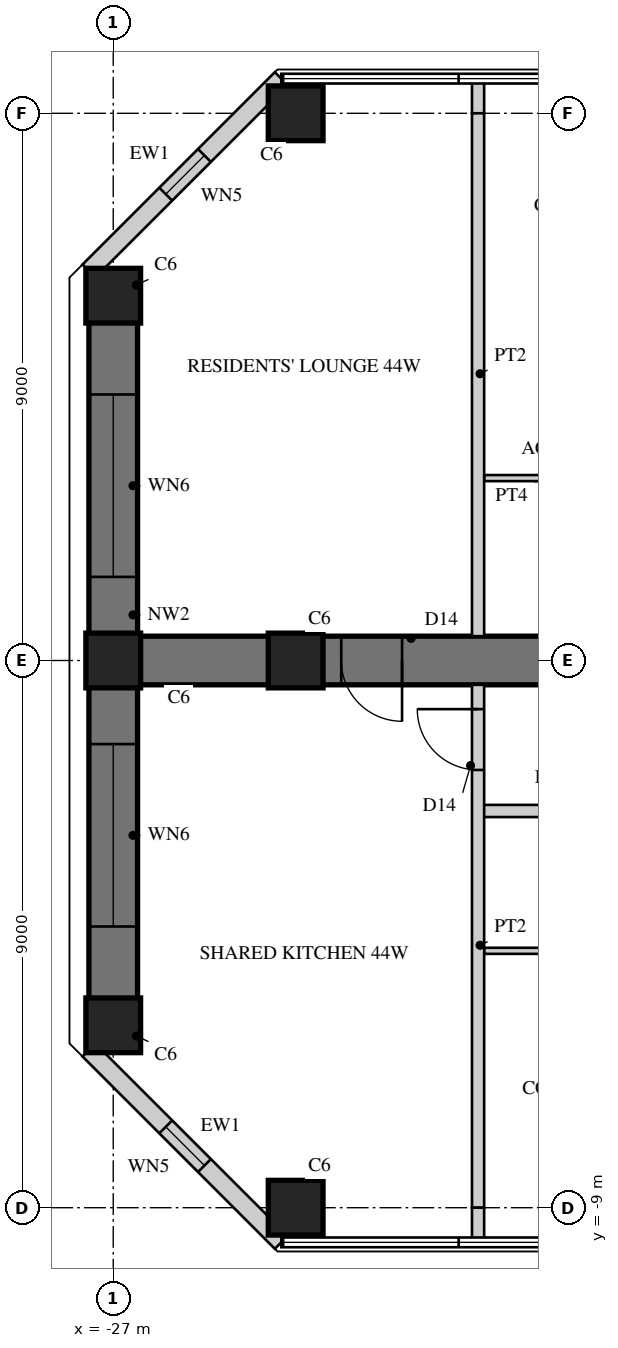
"""IFC4 building model, lengths in metres.
Left out: names, types, materials, properties, quantities, classifications, styles, units other than length and angle.
Written with IfcOpenShell. Run it as: python <this file> out.ifc"""

import sys

from ifc_helpers import new_model, si_unit, direction, frame, frame_2d, origin, origin_2d, place, context, subcontext, project, spatial, rectangle, hollow_rectangle, extrude, element, fill, save


model = new_model("IFC4")
c1 = context("Model", 3, precision=1e-05, world=origin(), true_north=direction((0.0, 1.0)))
c2 = subcontext(c1, "Body", "Model", "MODEL_VIEW")
j1 = project(units=[si_unit("LENGTHUNIT", "METRE"), si_unit("PLANEANGLEUNIT", "RADIAN")], contexts=[c1])
p1 = place(None, origin())
s1 = spatial("IfcSite", under=j1, at=p1, CompositionType="ELEMENT")
p2 = place(p1, origin())
s2 = spatial("IfcBuilding", under=s1, at=p2, CompositionType="ELEMENT")
p3 = place(p2, frame((0.0, 0.0, 179.7)))
s3 = spatial("IfcBuildingStorey", under=s2, at=p3, CompositionType="ELEMENT", Elevation=179.7)
p4 = place(p3, frame((-9.0, 0.0, 0.0), z_axis=(0.0, 0.0, 1.0), x_axis=(-1.0, 0.0, 0.0)))
e1 = element("IfcWall", 1, at=p4, inside=s3, PredefinedType="SHEAR", context=c2, shape_type="SweptSolid", body=[
    extrude(rectangle(XDim=18.0, YDim=0.8, at=frame_2d((9.0, 0.0))), origin(), (0.0, 0.0, 1.0), 3.4),
])
p5 = place(p4, frame((3.95, 0.0, 0.0)))
e2 = element("IfcOpeningElement", 2, at=p5, cuts=e1, PredefinedType="OPENING", context=c2, shape_type="SweptSolid", body=[
    extrude(rectangle(XDim=1.0, YDim=2.15, at=frame_2d((0.5, 1.075))), frame((0.0, 0.41, 0.0), z_axis=(0.0, -1.0, 0.0), x_axis=(1.0, 0.0, 0.0)), (0.0, 0.0, 1.0), 0.82),
])
p6 = place(p4, frame((6.6, 0.0, 0.0)))
e3 = element("IfcOpeningElement", 3, at=p6, cuts=e1, PredefinedType="OPENING", context=c2, shape_type="SweptSolid", body=[
    extrude(rectangle(XDim=1.0, YDim=2.15, at=frame_2d((0.5, 1.075))), frame((0.0, 0.41, 0.0), z_axis=(0.0, -1.0, 0.0), x_axis=(1.0, 0.0, 0.0)), (0.0, 0.0, 1.0), 0.82),
])
p7 = place(p4, frame((13.25, 0.0, 0.0)))
e4 = element("IfcOpeningElement", 4, at=p7, cuts=e1, PredefinedType="OPENING", context=c2, shape_type="SweptSolid", body=[
    extrude(rectangle(XDim=1.0, YDim=2.2, at=frame_2d((0.5, 1.1))), frame((0.0, 0.41, 0.0), z_axis=(0.0, -1.0, 0.0), x_axis=(1.0, 0.0, 0.0)), (0.0, 0.0, 1.0), 0.82),
])
p8 = place(p3, frame((-27.0, 6.0, 0.0), z_axis=(0.0, 0.0, 1.0), x_axis=(0.0, -1.0, 0.0)))
e5 = element("IfcWall", 5, at=p8, inside=s3, PredefinedType="SHEAR", context=c2, shape_type="SweptSolid", body=[
    extrude(rectangle(XDim=12.0, YDim=0.8, at=frame_2d((6.0, 0.0))), origin(), (0.0, 0.0, 1.0), 3.4),
])
p9 = place(p8, frame((1.625, 0.0, 0.6)))
e6 = element("IfcOpeningElement", 6, at=p9, cuts=e5, PredefinedType="OPENING", context=c2, shape_type="SweptSolid", body=[
    extrude(rectangle(XDim=3.0, YDim=2.4, at=frame_2d((1.5, 1.2))), frame((0.0, 0.41, 0.0), z_axis=(0.0, -1.0, 0.0), x_axis=(1.0, 0.0, 0.0)), (0.0, 0.0, 1.0), 0.82),
])
p10 = place(p8, frame((7.375, 0.0, 0.6)))
e7 = element("IfcOpeningElement", 7, at=p10, cuts=e5, PredefinedType="OPENING", context=c2, shape_type="SweptSolid", body=[
    extrude(rectangle(XDim=3.0, YDim=2.4, at=frame_2d((1.5, 1.2))), frame((0.0, 0.41, 0.0), z_axis=(0.0, -1.0, 0.0), x_axis=(1.0, 0.0, 0.0)), (0.0, 0.0, 1.0), 0.82),
])
for number, where, z_axis, x_axis in (
    (8, (-24.0, 9.0, 0.0), (0.0, 0.0, 1.0), (1.0, 0.0, 0.0)),
    (9, (-24.0, -9.0, 0.0), (0.0, 0.0, 1.0), (1.0, 0.0, 0.0)),
    (10, (-27.0, 6.0, 0.0), (0.0, 0.0, 1.0), (1.0, 0.0, 0.0)),
    (11, (-27.0, 0.0, 0.0), (0.0, 0.0, 1.0), (1.0, 0.0, 0.0)),
    (12, (-27.0, -6.0, 0.0), (0.0, 0.0, 1.0), (1.0, 0.0, 0.0)),
    (13, (-24.0, 0.0, 0.0), (0.0, 0.0, 1.0), (1.0, 0.0, 0.0)),
):
    element("IfcColumn", number, at=place(p3, frame(where, z_axis=z_axis, x_axis=x_axis)), inside=s3, PredefinedType="COLUMN", context=c2, shape_type="SweptSolid", body=[
        extrude(rectangle(XDim=0.9, YDim=0.9, at=origin_2d()), origin(), (0.0, 0.0, 1.0), 3.4),
    ])
p11 = place(p3, frame((-24.236, 9.57, 0.0), z_axis=(0.0, 0.0, 1.0), x_axis=(-0.707079499254, -0.707134062067, 0.0)))
e14 = element("IfcWall", 14, at=p11, inside=s3, PredefinedType="SOLIDWALL", context=c2, shape_type="SweptSolid", body=[
    extrude(rectangle(XDim=4.475, YDim=0.3, at=frame_2d((2.237, 0.0))), origin(), (0.0, 0.0, 1.0), 3.22),
])
p12 = place(p11, frame((1.787, 0.0, 0.3)))
e15 = element("IfcOpeningElement", 15, at=p12, cuts=e14, PredefinedType="OPENING", context=c2, shape_type="SweptSolid", body=[
    extrude(rectangle(XDim=0.9, YDim=2.4, at=frame_2d((0.45, 1.2))), frame((0.0, 0.16, 0.0), z_axis=(0.0, -1.0, 0.0), x_axis=(1.0, 0.0, 0.0)), (0.0, 0.0, 1.0), 0.32),
])
p13 = place(p3, frame((-27.4, -6.406, 0.0), z_axis=(0.0, 0.0, 1.0), x_axis=(0.707079499254, -0.707134062067, 0.0)))
e16 = element("IfcWall", 16, at=p13, inside=s3, PredefinedType="SOLIDWALL", context=c2, shape_type="SweptSolid", body=[
    extrude(rectangle(XDim=4.475, YDim=0.3, at=frame_2d((2.237, 0.0))), origin(), (0.0, 0.0, 1.0), 3.22),
])
p14 = place(p13, frame((1.787, 0.0, 0.3)))
e17 = element("IfcOpeningElement", 17, at=p14, cuts=e16, PredefinedType="OPENING", context=c2, shape_type="SweptSolid", body=[
    extrude(rectangle(XDim=0.9, YDim=2.4, at=frame_2d((0.45, 1.2))), frame((0.0, 0.16, 0.0), z_axis=(0.0, -1.0, 0.0), x_axis=(1.0, 0.0, 0.0)), (0.0, 0.0, 1.0), 0.32),
])
for number, where, z_axis, x_axis in (
    (18, (-18.45, -4.775, 0.0), (0.0, 0.0, 1.0), (-1.0, 0.0, 0.0)),
    (19, (-18.45, 3.0, 0.0), (0.0, 0.0, 1.0), (-1.0, 0.0, 0.0)),
):
    element("IfcWall", number, at=place(p3, frame(where, z_axis=z_axis, x_axis=x_axis)), inside=s3, PredefinedType="PARTITIONING", context=c2, shape_type="SweptSolid", body=[
        extrude(rectangle(XDim=2.45, YDim=0.1, at=frame_2d((1.225, 0.0))), origin(), (0.0, 0.0, 1.0), 3.22),
    ])
p15 = place(p3, frame((-9.55, -2.475, 0.0), z_axis=(0.0, 0.0, 1.0), x_axis=(-1.0, 0.0, 0.0)))
e20 = element("IfcWall", 20, at=p15, inside=s3, PredefinedType="SOLIDWALL", context=c2, shape_type="SweptSolid", body=[
    extrude(rectangle(XDim=11.45, YDim=0.2, at=frame_2d((5.725, 0.0))), origin(), (0.0, 0.0, 1.0), 3.22),
])
p16 = place(p15, frame((3.6, 0.0, 0.0)))
e21 = element("IfcOpeningElement", 21, at=p16, cuts=e20, PredefinedType="OPENING", context=c2, shape_type="SweptSolid", body=[
    extrude(rectangle(XDim=1.0, YDim=2.15, at=frame_2d((0.5, 1.075))), frame((0.0, 0.11, 0.0), z_axis=(0.0, -1.0, 0.0), x_axis=(1.0, 0.0, 0.0)), (0.0, 0.0, 1.0), 0.22),
])
p17 = place(p15, frame((6.05, 0.0, 0.0)))
e22 = element("IfcOpeningElement", 22, at=p17, cuts=e20, PredefinedType="OPENING", context=c2, shape_type="SweptSolid", body=[
    extrude(rectangle(XDim=1.0, YDim=2.15, at=frame_2d((0.5, 1.075))), frame((0.0, 0.11, 0.0), z_axis=(0.0, -1.0, 0.0), x_axis=(1.0, 0.0, 0.0)), (0.0, 0.0, 1.0), 0.22),
])
p18 = place(p3, frame((-21.0, 9.53, 0.0), z_axis=(0.0, 0.0, 1.0), x_axis=(0.0, -1.0, 0.0)))
e23 = element("IfcWall", 23, at=p18, inside=s3, PredefinedType="SOLIDWALL", context=c2, shape_type="SweptSolid", body=[
    extrude(rectangle(XDim=0.53, YDim=0.2, at=frame_2d((0.265, 0.0))), origin(), (0.0, 0.0, 1.0), 3.22),
])
p19 = place(p3, frame((-21.0, 9.0, 0.0), z_axis=(0.0, 0.0, 1.0), x_axis=(0.0, -1.0, 0.0)))
e24 = element("IfcWall", 24, at=p19, inside=s3, PredefinedType="SOLIDWALL", context=c2, shape_type="SweptSolid", body=[
    extrude(rectangle(XDim=8.6, YDim=0.2, at=frame_2d((4.3, 0.0))), origin(), (0.0, 0.0, 1.0), 2.62),
])
p20 = place(p3, frame((-21.0, -0.4, 0.0), z_axis=(0.0, 0.0, 1.0), x_axis=(0.0, -1.0, 0.0)))
e25 = element("IfcWall", 25, at=p20, inside=s3, PredefinedType="SOLIDWALL", context=c2, shape_type="SweptSolid", body=[
    extrude(rectangle(XDim=8.6, YDim=0.2, at=frame_2d((4.3, 0.0))), origin(), (0.0, 0.0, 1.0), 2.62),
])
p21 = place(p20, frame((0.4, 0.0, 0.0)))
e26 = element("IfcOpeningElement", 26, at=p21, cuts=e25, PredefinedType="OPENING", context=c2, shape_type="SweptSolid", body=[
    extrude(rectangle(XDim=1.0, YDim=2.2, at=frame_2d((0.5, 1.1))), frame((0.0, 0.11, 0.0), z_axis=(0.0, -1.0, 0.0), x_axis=(1.0, 0.0, 0.0)), (0.0, 0.0, 1.0), 0.22),
])
p22 = place(p3, frame((-21.0, -9.0, 0.0), z_axis=(0.0, 0.0, 1.0), x_axis=(0.0, -1.0, 0.0)))
e27 = element("IfcWall", 27, at=p22, inside=s3, PredefinedType="SOLIDWALL", context=c2, shape_type="SweptSolid", body=[
    extrude(rectangle(XDim=0.53, YDim=0.2, at=frame_2d((0.265, 0.0))), origin(), (0.0, 0.0, 1.0), 3.22),
])
p23 = place(p12, origin())
e28 = element("IfcWindow", 28, at=p23, inside=s3, PartitioningType="SINGLE_PANEL", PredefinedType="WINDOW", context=c2, shape_type="SweptSolid", body=[
    extrude(hollow_rectangle(XDim=0.9, YDim=2.4, WallThickness=0.06, at=frame_2d((0.45, 1.2))), frame((0.0, 0.03, 0.0), z_axis=(0.0, -1.0, 0.0), x_axis=(1.0, 0.0, 0.0)), (0.0, 0.0, 1.0), 0.06),
    extrude(rectangle(XDim=0.779, YDim=2.279, at=frame_2d((0.45, 1.2))), frame((0.0, 0.03, 0.0), z_axis=(0.0, -1.0, 0.0), x_axis=(1.0, 0.0, 0.0)), (0.0, 0.0, 1.0), 0.06),
])
fill(e15, e28)
p24 = place(p9, origin())
e29 = element("IfcWindow", 29, at=p24, inside=s3, PartitioningType="SINGLE_PANEL", PredefinedType="WINDOW", context=c2, shape_type="SweptSolid", body=[
    extrude(hollow_rectangle(XDim=3.0, YDim=2.4, WallThickness=0.06, at=frame_2d((1.5, 1.2))), frame((0.0, 0.03, 0.0), z_axis=(0.0, -1.0, 0.0), x_axis=(1.0, 0.0, 0.0)), (0.0, 0.0, 1.0), 0.06),
    extrude(rectangle(XDim=2.879, YDim=2.279, at=frame_2d((1.5, 1.2))), frame((0.0, 0.03, 0.0), z_axis=(0.0, -1.0, 0.0), x_axis=(1.0, 0.0, 0.0)), (0.0, 0.0, 1.0), 0.06),
])
fill(e6, e29)
p25 = place(p10, origin())
e30 = element("IfcWindow", 30, at=p25, inside=s3, PartitioningType="SINGLE_PANEL", PredefinedType="WINDOW", context=c2, shape_type="SweptSolid", body=[
    extrude(hollow_rectangle(XDim=3.0, YDim=2.4, WallThickness=0.06, at=frame_2d((1.5, 1.2))), frame((0.0, 0.03, 0.0), z_axis=(0.0, -1.0, 0.0), x_axis=(1.0, 0.0, 0.0)), (0.0, 0.0, 1.0), 0.06),
    extrude(rectangle(XDim=2.879, YDim=2.279, at=frame_2d((1.5, 1.2))), frame((0.0, 0.03, 0.0), z_axis=(0.0, -1.0, 0.0), x_axis=(1.0, 0.0, 0.0)), (0.0, 0.0, 1.0), 0.06),
])
fill(e7, e30)
p26 = place(p14, origin())
e31 = element("IfcWindow", 31, at=p26, inside=s3, PartitioningType="SINGLE_PANEL", PredefinedType="WINDOW", context=c2, shape_type="SweptSolid", body=[
    extrude(hollow_rectangle(XDim=0.9, YDim=2.4, WallThickness=0.06, at=frame_2d((0.45, 1.2))), frame((0.0, 0.03, 0.0), z_axis=(0.0, -1.0, 0.0), x_axis=(1.0, 0.0, 0.0)), (0.0, 0.0, 1.0), 0.06),
    extrude(rectangle(XDim=0.779, YDim=2.279, at=frame_2d((0.45, 1.2))), frame((0.0, 0.03, 0.0), z_axis=(0.0, -1.0, 0.0), x_axis=(1.0, 0.0, 0.0)), (0.0, 0.0, 1.0), 0.06),
])
fill(e17, e31)
p27 = place(p21, frame((1.0, 0.0, 0.0), z_axis=(0.0, 0.0, 1.0), x_axis=(-1.0, 0.0, 0.0)))
e32 = element("IfcDoor", 32, at=p27, inside=s3, OperationType="SINGLE_SWING_RIGHT", PredefinedType="DOOR", context=c2, shape_type="SweptSolid", body=[
    extrude(rectangle(XDim=1.0, YDim=2.2, at=frame_2d((0.5, 1.1))), frame((0.0, 0.025, 0.0), z_axis=(0.0, -1.0, 0.0), x_axis=(1.0, 0.0, 0.0)), (0.0, 0.0, 1.0), 0.05),
])
fill(e26, e32)
p28 = place(p7, origin())
e33 = element("IfcDoor", 33, at=p28, inside=s3, OperationType="SINGLE_SWING_LEFT", PredefinedType="DOOR", context=c2, shape_type="SweptSolid", body=[
    extrude(rectangle(XDim=1.0, YDim=2.2, at=frame_2d((0.5, 1.1))), frame((0.0, 0.025, 0.0), z_axis=(0.0, -1.0, 0.0), x_axis=(1.0, 0.0, 0.0)), (0.0, 0.0, 1.0), 0.05),
])
fill(e4, e33)
save(model, sys.argv[1])
